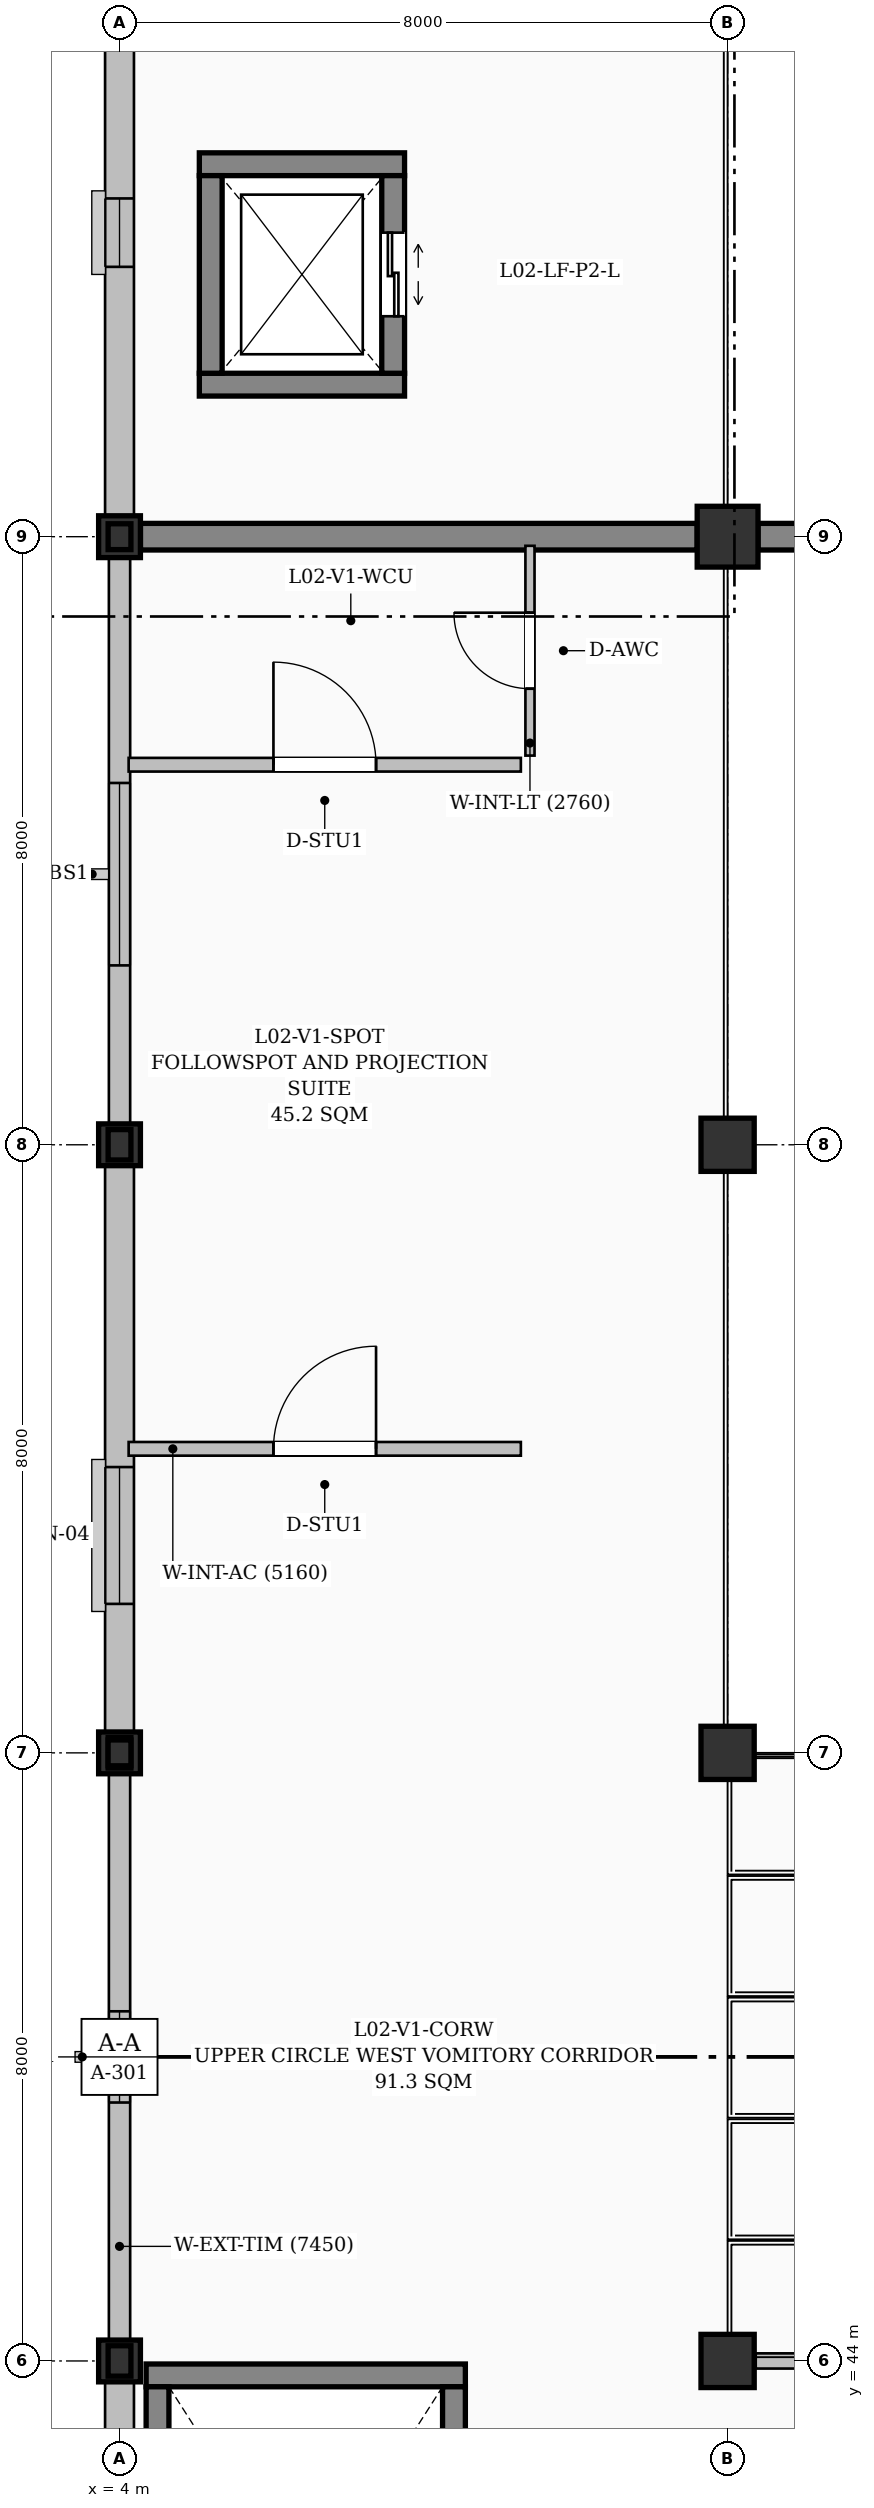
"""IFC4 building model, lengths in metres.
Left out: names, types, materials, properties, quantities, classifications, styles, units other than length and angle.
Written with IfcOpenShell. Run it as: python <this file> out.ifc"""

import sys

from ifc_helpers import new_model, si_unit, direction, frame, frame_2d, origin, origin_2d, place, context, subcontext, project, spatial, rectangle, i_section, extrude, element, fill, save


model = new_model("IFC4")
c1 = context("Model", 3, precision=1e-05, world=origin(), true_north=direction((0.0, 1.0)))
c2 = subcontext(c1, "Body", "Model", "MODEL_VIEW")
j1 = project(units=[si_unit("LENGTHUNIT", "METRE"), si_unit("PLANEANGLEUNIT", "RADIAN")], contexts=[c1])
p1 = place(None, origin())
s1 = spatial("IfcSite", under=j1, at=p1, CompositionType="ELEMENT")
p2 = place(p1, origin())
s2 = spatial("IfcBuilding", under=s1, at=p2, CompositionType="ELEMENT")
p3 = place(p2, frame((0.0, 0.0, 9.3)))
s3 = spatial("IfcBuildingStorey", under=s2, at=p3, CompositionType="ELEMENT", Elevation=9.3)
for number, where, z_axis, x_axis in (
    (1, (4.0, 44.0, 0.0), (0.0, 0.0, 1.0), (1.0, 0.0, 0.0)),
    (2, (4.0, 52.0, 0.0), (0.0, 0.0, 1.0), (1.0, 0.0, 0.0)),
    (3, (4.0, 60.0, 0.0), (0.0, 0.0, 1.0), (1.0, 0.0, 0.0)),
    (4, (4.0, 68.0, 0.0), (0.0, 0.0, 1.0), (1.0, 0.0, 0.0)),
):
    element("IfcColumn", number, at=place(p3, frame(where, z_axis=z_axis, x_axis=x_axis)), inside=s3, PredefinedType="COLUMN", context=c2, shape_type="SweptSolid", body=[
        extrude(rectangle(XDim=0.55, YDim=0.55, at=origin_2d()), origin(), (0.0, 0.0, 1.0), 4.5),
    ])
for number, where, z_axis, x_axis in (
    (5, (12.0, 44.0, 0.0), (0.0, 0.0, 1.0), (1.0, 0.0, 0.0)),
    (6, (12.0, 52.0, 0.0), (0.0, 0.0, 1.0), (1.0, 0.0, 0.0)),
    (7, (12.0, 60.0, 0.0), (0.0, 0.0, 1.0), (1.0, 0.0, 0.0)),
):
    element("IfcColumn", number, at=place(p3, frame(where, z_axis=z_axis, x_axis=x_axis)), inside=s3, PredefinedType="COLUMN", context=c2, shape_type="SweptSolid", body=[
        extrude(rectangle(XDim=0.7, YDim=0.7, at=origin_2d()), origin(), (0.0, 0.0, 1.0), 4.5),
    ])
p4 = place(p3, frame((12.0, 68.0, 0.0), z_axis=(0.0, 0.0, 1.0), x_axis=(1.0, 0.0, 0.0)))
e8 = element("IfcColumn", 8, at=p4, inside=s3, PredefinedType="COLUMN", context=c2, shape_type="SweptSolid", body=[
    extrude(rectangle(XDim=0.8, YDim=0.8, at=origin_2d()), origin(), (0.0, 0.0, 1.0), 4.5),
])
p5 = place(p3, frame((4.275, 68.0, 0.0), z_axis=(0.0, 0.0, 1.0), x_axis=(1.0, 0.0, 0.0)))
e9 = element("IfcWall", 9, at=p5, inside=s3, PredefinedType="SHEAR", context=c2, shape_type="SweptSolid", body=[
    extrude(rectangle(XDim=7.325, YDim=0.35, at=frame_2d((3.663, 0.0))), origin(), (0.0, 0.0, 1.0), 3.415),
])
p6 = place(p3, frame((12.4, 68.0, 0.0), z_axis=(0.0, 0.0, 1.0), x_axis=(1.0, 0.0, 0.0)))
e10 = element("IfcWall", 10, at=p6, inside=s3, PredefinedType="SHEAR", context=c2, shape_type="SweptSolid", body=[
    extrude(rectangle(XDim=7.2, YDim=0.35, at=frame_2d((3.6, 0.0))), origin(), (0.0, 0.0, 1.0), 3.415),
])
for number, where, z_axis, x_axis in (
    (11, (4.0, 44.0, 4.5), (0.0, 0.0, 1.0), (1.0, 0.0, 0.0)),
    (12, (4.0, 52.0, 4.5), (0.0, 0.0, 1.0), (1.0, 0.0, 0.0)),
    (13, (4.0, 60.0, 4.5), (0.0, 0.0, 1.0), (1.0, 0.0, 0.0)),
):
    element("IfcColumn", number, at=place(p3, frame(where, z_axis=z_axis, x_axis=x_axis)), inside=s3, PredefinedType="COLUMN", context=c2, shape_type="SweptSolid", body=[
        extrude(i_section(OverallWidth=0.3, OverallDepth=0.4, WebThickness=0.013, FlangeThickness=0.024, FilletRadius=0.027, at=origin_2d()), origin(), (0.0, 0.0, 1.0), 4.0),
    ])
p7 = place(p3, frame((4.0, 68.0, 9.0), z_axis=(0.0, 0.0, 1.0), x_axis=(1.0, 0.0, 0.0)))
e14 = element("IfcColumn", 14, at=p7, inside=s3, PredefinedType="COLUMN", context=c2, shape_type="SweptSolid", body=[
    extrude(i_section(OverallWidth=0.3, OverallDepth=0.34, WebThickness=0.012, FlangeThickness=0.021, FilletRadius=0.027, at=origin_2d()), origin(), (0.0, 0.0, 1.0), 1.515),
])
p8 = place(p3, frame((4.0, 52.0, 8.5), z_axis=(0.0, 0.0, 1.0), x_axis=(1.0, 0.0, 0.0)))
e15 = element("IfcColumn", 15, at=p8, inside=s3, PredefinedType="COLUMN", context=c2, shape_type="SweptSolid", body=[
    extrude(i_section(OverallWidth=0.3, OverallDepth=0.34, WebThickness=0.012, FlangeThickness=0.021, FilletRadius=0.027, at=origin_2d()), origin(), (0.0, 0.0, 1.0), 2.015),
])
p9 = place(p3, frame((4.0, 36.275, 0.0), z_axis=(0.0, 0.0, 1.0), x_axis=(0.0, 1.0, 0.0)))
e16 = element("IfcWall", 16, at=p9, inside=s3, PredefinedType="SOLIDWALL", context=c2, shape_type="SweptSolid", body=[
    extrude(rectangle(XDim=7.45, YDim=0.38, at=frame_2d((3.725, 0.0))), origin(), (0.0, 0.0, 1.0), 4.12),
])
p10 = place(p9, frame((3.275, 0.0, 0.95)))
e17 = element("IfcOpeningElement", 17, at=p10, cuts=e16, PredefinedType="OPENING", context=c2, shape_type="SweptSolid", body=[
    extrude(rectangle(XDim=0.9, YDim=1.8, at=frame_2d((0.45, 0.9))), frame((0.0, 0.2, 0.0), z_axis=(0.0, -1.0, 0.0), x_axis=(1.0, 0.0, 0.0)), (0.0, 0.0, 1.0), 0.4),
])
p11 = place(p3, frame((4.0, 44.275, 0.0), z_axis=(0.0, 0.0, 1.0), x_axis=(0.0, 1.0, 0.0)))
e18 = element("IfcWall", 18, at=p11, inside=s3, PredefinedType="SOLIDWALL", context=c2, shape_type="SweptSolid", body=[
    extrude(rectangle(XDim=7.45, YDim=0.28, at=frame_2d((3.725, 0.0))), origin(), (0.0, 0.0, 1.0), 4.12),
])
p12 = place(p11, frame((3.125, 0.0, 0.95)))
e19 = element("IfcOpeningElement", 19, at=p12, cuts=e18, PredefinedType="OPENING", context=c2, shape_type="SweptSolid", body=[
    extrude(rectangle(XDim=1.2, YDim=1.8, at=frame_2d((0.6, 0.9))), frame((0.0, 0.15, 0.0), z_axis=(0.0, -1.0, 0.0), x_axis=(1.0, 0.0, 0.0)), (0.0, 0.0, 1.0), 0.3),
])
p13 = place(p3, frame((4.0, 52.275, 0.0), z_axis=(0.0, 0.0, 1.0), x_axis=(0.0, 1.0, 0.0)))
e20 = element("IfcWall", 20, at=p13, inside=s3, PredefinedType="SOLIDWALL", context=c2, shape_type="SweptSolid", body=[
    extrude(rectangle(XDim=7.45, YDim=0.38, at=frame_2d((3.725, 0.0))), origin(), (0.0, 0.0, 1.0), 4.12),
])
p14 = place(p13, frame((1.685, 0.0, 0.95)))
e21 = element("IfcOpeningElement", 21, at=p14, cuts=e20, PredefinedType="OPENING", context=c2, shape_type="SweptSolid", body=[
    extrude(rectangle(XDim=1.8, YDim=1.8, at=frame_2d((0.9, 0.9))), frame((0.0, 0.2, 0.0), z_axis=(0.0, -1.0, 0.0), x_axis=(1.0, 0.0, 0.0)), (0.0, 0.0, 1.0), 0.4),
])
p15 = place(p3, frame((4.0, 60.275, 0.0), z_axis=(0.0, 0.0, 1.0), x_axis=(0.0, 1.0, 0.0)))
e22 = element("IfcWall", 22, at=p15, inside=s3, PredefinedType="SOLIDWALL", context=c2, shape_type="SweptSolid", body=[
    extrude(rectangle(XDim=7.45, YDim=0.28, at=frame_2d((3.725, 0.0))), origin(), (0.0, 0.0, 1.0), 4.12),
])
p16 = place(p15, frame((2.085, 0.0, 0.95)))
e23 = element("IfcOpeningElement", 23, at=p16, cuts=e22, PredefinedType="OPENING", context=c2, shape_type="SweptSolid", body=[
    extrude(rectangle(XDim=2.4, YDim=1.8, at=frame_2d((1.2, 0.9))), frame((0.0, 0.15, 0.0), z_axis=(0.0, -1.0, 0.0), x_axis=(1.0, 0.0, 0.0)), (0.0, 0.0, 1.0), 0.3),
])
p17 = place(p3, frame((4.0, 68.275, 0.0), z_axis=(0.0, 0.0, 1.0), x_axis=(0.0, 1.0, 0.0)))
e24 = element("IfcWall", 24, at=p17, inside=s3, PredefinedType="SOLIDWALL", context=c2, shape_type="SweptSolid", body=[
    extrude(rectangle(XDim=7.45, YDim=0.38, at=frame_2d((3.725, 0.0))), origin(), (0.0, 0.0, 1.0), 3.655),
])
p18 = place(p17, frame((3.275, 0.0, 0.95)))
e25 = element("IfcOpeningElement", 25, at=p18, cuts=e24, PredefinedType="OPENING", context=c2, shape_type="SweptSolid", body=[
    extrude(rectangle(XDim=0.9, YDim=1.8, at=frame_2d((0.45, 0.9))), frame((0.0, 0.2, 0.0), z_axis=(0.0, -1.0, 0.0), x_axis=(1.0, 0.0, 0.0)), (0.0, 0.0, 1.0), 0.4),
])
p19 = place(p3, frame((8.55, 43.81, 0.0), z_axis=(0.0, 0.0, 1.0), x_axis=(-1.0, 0.0, 0.0)))
e26 = element("IfcWall", 26, at=p19, inside=s3, PredefinedType="SHEAR", context=c2, shape_type="SweptSolid", body=[
    extrude(rectangle(XDim=4.2, YDim=0.3, at=frame_2d((2.1, 0.0))), origin(), (0.0, 0.0, 1.0), 4.25),
])
p20 = place(p3, frame((4.5, 36.34, 0.0), z_axis=(0.0, 0.0, 1.0), x_axis=(0.0, 1.0, 0.0)))
e27 = element("IfcWall", 27, at=p20, inside=s3, PredefinedType="SHEAR", context=c2, shape_type="SweptSolid", body=[
    extrude(rectangle(XDim=7.32, YDim=0.3, at=frame_2d((3.66, 0.0))), origin(), (0.0, 0.0, 1.0), 4.25),
])
p21 = place(p3, frame((8.4, 36.34, 0.0), z_axis=(0.0, 0.0, 1.0), x_axis=(0.0, 1.0, 0.0)))
e28 = element("IfcWall", 28, at=p21, inside=s3, PredefinedType="SHEAR", context=c2, shape_type="SweptSolid", body=[
    extrude(rectangle(XDim=7.32, YDim=0.3, at=frame_2d((3.66, 0.0))), origin(), (0.0, 0.0, 1.0), 4.25),
])
p22 = place(p21, frame((0.35, 0.0, 0.0)))
e29 = element("IfcOpeningElement", 29, at=p22, cuts=e28, PredefinedType="OPENING", context=c2, shape_type="SweptSolid", body=[
    extrude(rectangle(XDim=1.2, YDim=2.15, at=frame_2d((0.6, 1.075))), frame((0.0, 0.16, 0.0), z_axis=(0.0, -1.0, 0.0), x_axis=(1.0, 0.0, 0.0)), (0.0, 0.0, 1.0), 0.32),
])
for number, where, z_axis, x_axis in (
    (30, (5.05, 70.0, 0.0), (0.0, 0.0, 1.0), (1.0, 0.0, 0.0)),
    (31, (7.75, 72.9, 0.0), (0.0, 0.0, 1.0), (-1.0, 0.0, 0.0)),
):
    element("IfcWall", number, at=place(p3, frame(where, z_axis=z_axis, x_axis=x_axis)), inside=s3, PredefinedType="SHEAR", context=c2, shape_type="SweptSolid", body=[
        extrude(rectangle(XDim=2.7, YDim=0.3, at=frame_2d((1.35, 0.0))), origin(), (0.0, 0.0, 1.0), 4.27),
    ])
p23 = place(p3, frame((5.2, 70.15, 0.0), z_axis=(0.0, 0.0, 1.0), x_axis=(0.0, 1.0, 0.0)))
e32 = element("IfcWall", 32, at=p23, inside=s3, PredefinedType="SHEAR", context=c2, shape_type="SweptSolid", body=[
    extrude(rectangle(XDim=2.6, YDim=0.3, at=frame_2d((1.3, 0.0))), origin(), (0.0, 0.0, 1.0), 4.27),
])
p24 = place(p3, frame((7.6, 72.75, 0.0), z_axis=(0.0, 0.0, 1.0), x_axis=(0.0, -1.0, 0.0)))
e33 = element("IfcWall", 33, at=p24, inside=s3, PredefinedType="SHEAR", context=c2, shape_type="SweptSolid", body=[
    extrude(rectangle(XDim=2.6, YDim=0.3, at=frame_2d((1.3, 0.0))), origin(), (0.0, 0.0, 1.0), 4.27),
])
p25 = place(p24, frame((0.75, 0.0, 0.0)))
e34 = element("IfcOpeningElement", 34, at=p25, cuts=e33, PredefinedType="OPENING", context=c2, shape_type="SweptSolid", body=[
    extrude(rectangle(XDim=1.1, YDim=2.15, at=frame_2d((0.55, 1.075))), frame((0.0, 0.16, 0.0), z_axis=(0.0, -1.0, 0.0), x_axis=(1.0, 0.0, 0.0)), (0.0, 0.0, 1.0), 0.32),
])
p26 = place(p3, frame((12.37, 44.0, 0.0), z_axis=(0.0, 0.0, 1.0), x_axis=(1.0, 0.0, 0.0)))
e35 = element("IfcWall", 35, at=p26, inside=s3, PredefinedType="PARTITIONING", context=c2, shape_type="SweptSolid", body=[
    extrude(rectangle(XDim=31.26, YDim=0.2, at=frame_2d((15.63, 0.0))), origin(), (0.0, 0.0, 1.0), 4.25),
])
p27 = place(p26, frame((10.979, 0.0, 0.0)))
e36 = element("IfcOpeningElement", 36, at=p27, cuts=e35, PredefinedType="OPENING", context=c2, shape_type="SweptSolid", body=[
    extrude(rectangle(XDim=1.8, YDim=2.35, at=frame_2d((0.9, 1.175))), frame((0.0, 0.11, 0.0), z_axis=(0.0, -1.0, 0.0), x_axis=(1.0, 0.0, 0.0)), (0.0, 0.0, 1.0), 0.22),
])
p28 = place(p3, frame((4.12, 56.0, 0.0), z_axis=(0.0, 0.0, 1.0), x_axis=(1.0, 0.0, 0.0)))
e37 = element("IfcWall", 37, at=p28, inside=s3, PredefinedType="PARTITIONING", context=c2, shape_type="SweptSolid", body=[
    extrude(rectangle(XDim=5.16, YDim=0.18, at=frame_2d((2.58, 0.0))), origin(), (0.0, 0.0, 1.0), 4.25),
])
p29 = place(p28, frame((1.905, 0.0, 0.0)))
e38 = element("IfcOpeningElement", 38, at=p29, cuts=e37, PredefinedType="OPENING", context=c2, shape_type="SweptSolid", body=[
    extrude(rectangle(XDim=1.35, YDim=2.2, at=frame_2d((0.675, 1.1))), frame((0.0, 0.1, 0.0), z_axis=(0.0, -1.0, 0.0), x_axis=(1.0, 0.0, 0.0)), (0.0, 0.0, 1.0), 0.2),
])
p30 = place(p3, frame((4.12, 65.0, 0.0), z_axis=(0.0, 0.0, 1.0), x_axis=(1.0, 0.0, 0.0)))
e39 = element("IfcWall", 39, at=p30, inside=s3, PredefinedType="PARTITIONING", context=c2, shape_type="SweptSolid", body=[
    extrude(rectangle(XDim=5.16, YDim=0.18, at=frame_2d((2.58, 0.0))), origin(), (0.0, 0.0, 1.0), 4.25),
])
p31 = place(p30, frame((1.905, 0.0, 0.0)))
e40 = element("IfcOpeningElement", 40, at=p31, cuts=e39, PredefinedType="OPENING", context=c2, shape_type="SweptSolid", body=[
    extrude(rectangle(XDim=1.35, YDim=2.2, at=frame_2d((0.675, 1.1))), frame((0.0, 0.1, 0.0), z_axis=(0.0, -1.0, 0.0), x_axis=(1.0, 0.0, 0.0)), (0.0, 0.0, 1.0), 0.2),
])
p32 = place(p3, frame((9.4, 65.12, 0.0), z_axis=(0.0, 0.0, 1.0), x_axis=(0.0, 1.0, 0.0)))
e41 = element("IfcWall", 41, at=p32, inside=s3, PredefinedType="PARTITIONING", context=c2, shape_type="SweptSolid", body=[
    extrude(rectangle(XDim=2.76, YDim=0.12, at=frame_2d((1.38, 0.0))), origin(), (0.0, 0.0, 1.0), 4.25),
])
p33 = place(p32, frame((0.88, 0.0, 0.0)))
e42 = element("IfcOpeningElement", 42, at=p33, cuts=e41, PredefinedType="OPENING", context=c2, shape_type="SweptSolid", body=[
    extrude(rectangle(XDim=1.0, YDim=2.1, at=frame_2d((0.5, 1.05))), frame((0.0, 0.07, 0.0), z_axis=(0.0, -1.0, 0.0), x_axis=(1.0, 0.0, 0.0)), (0.0, 0.0, 1.0), 0.14),
])
p34 = place(p12, origin())
e43 = element("IfcWindow", 43, at=p34, inside=s3, PartitioningType="SINGLE_PANEL", PredefinedType="WINDOW", context=c2, shape_type="SweptSolid", body=[
    extrude(rectangle(XDim=1.2, YDim=1.8, at=frame_2d((0.6, 0.9))), frame((0.0, 0.03, 0.0), z_axis=(0.0, -1.0, 0.0), x_axis=(1.0, 0.0, 0.0)), (0.0, 0.0, 1.0), 0.06),
])
fill(e19, e43)
p35 = place(p14, origin())
e44 = element("IfcWindow", 44, at=p35, inside=s3, PartitioningType="DOUBLE_PANEL_VERTICAL", PredefinedType="WINDOW", context=c2, shape_type="SweptSolid", body=[
    extrude(rectangle(XDim=1.8, YDim=1.8, at=frame_2d((0.9, 0.9))), frame((0.0, 0.03, 0.0), z_axis=(0.0, -1.0, 0.0), x_axis=(1.0, 0.0, 0.0)), (0.0, 0.0, 1.0), 0.06),
])
fill(e21, e44)
p36 = place(p16, origin())
e45 = element("IfcWindow", 45, at=p36, inside=s3, PartitioningType="TRIPLE_PANEL_VERTICAL", PredefinedType="WINDOW", context=c2, shape_type="SweptSolid", body=[
    extrude(rectangle(XDim=2.4, YDim=1.8, at=frame_2d((1.2, 0.9))), frame((0.0, 0.03, 0.0), z_axis=(0.0, -1.0, 0.0), x_axis=(1.0, 0.0, 0.0)), (0.0, 0.0, 1.0), 0.06),
])
fill(e23, e45)
p37 = place(p18, origin())
e46 = element("IfcWindow", 46, at=p37, inside=s3, PartitioningType="SINGLE_PANEL", PredefinedType="WINDOW", context=c2, shape_type="SweptSolid", body=[
    extrude(rectangle(XDim=0.9, YDim=1.8, at=frame_2d((0.45, 0.9))), frame((0.0, 0.03, 0.0), z_axis=(0.0, -1.0, 0.0), x_axis=(1.0, 0.0, 0.0)), (0.0, 0.0, 1.0), 0.06),
])
fill(e25, e46)
p38 = place(p25, origin())
e47 = element("IfcDoor", 47, at=p38, inside=s3, OperationType="DOUBLE_DOOR_SLIDING", PredefinedType="DOOR", context=c2, shape_type="SweptSolid", body=[
    extrude(rectangle(XDim=1.1, YDim=2.15, at=frame_2d((0.55, 1.075))), frame((0.0, 0.025, 0.0), z_axis=(0.0, -1.0, 0.0), x_axis=(1.0, 0.0, 0.0)), (0.0, 0.0, 1.0), 0.05),
])
fill(e34, e47)
p39 = place(p29, origin())
e48 = element("IfcDoor", 48, at=p39, inside=s3, OperationType="SINGLE_SWING_RIGHT", PredefinedType="DOOR", context=c2, shape_type="SweptSolid", body=[
    extrude(rectangle(XDim=1.35, YDim=2.2, at=frame_2d((0.675, 1.1))), frame((0.0, 0.025, 0.0), z_axis=(0.0, -1.0, 0.0), x_axis=(1.0, 0.0, 0.0)), (0.0, 0.0, 1.0), 0.05),
])
fill(e38, e48)
p40 = place(p31, origin())
e49 = element("IfcDoor", 49, at=p40, inside=s3, OperationType="SINGLE_SWING_LEFT", PredefinedType="DOOR", context=c2, shape_type="SweptSolid", body=[
    extrude(rectangle(XDim=1.35, YDim=2.2, at=frame_2d((0.675, 1.1))), frame((0.0, 0.025, 0.0), z_axis=(0.0, -1.0, 0.0), x_axis=(1.0, 0.0, 0.0)), (0.0, 0.0, 1.0), 0.05),
])
fill(e40, e49)
p41 = place(p33, origin())
e50 = element("IfcDoor", 50, at=p41, inside=s3, OperationType="SINGLE_SWING_RIGHT", PredefinedType="DOOR", context=c2, shape_type="SweptSolid", body=[
    extrude(rectangle(XDim=1.0, YDim=2.1, at=frame_2d((0.5, 1.05))), frame((0.0, 0.025, 0.0), z_axis=(0.0, -1.0, 0.0), x_axis=(1.0, 0.0, 0.0)), (0.0, 0.0, 1.0), 0.05),
])
fill(e42, e50)
save(model, sys.argv[1])
